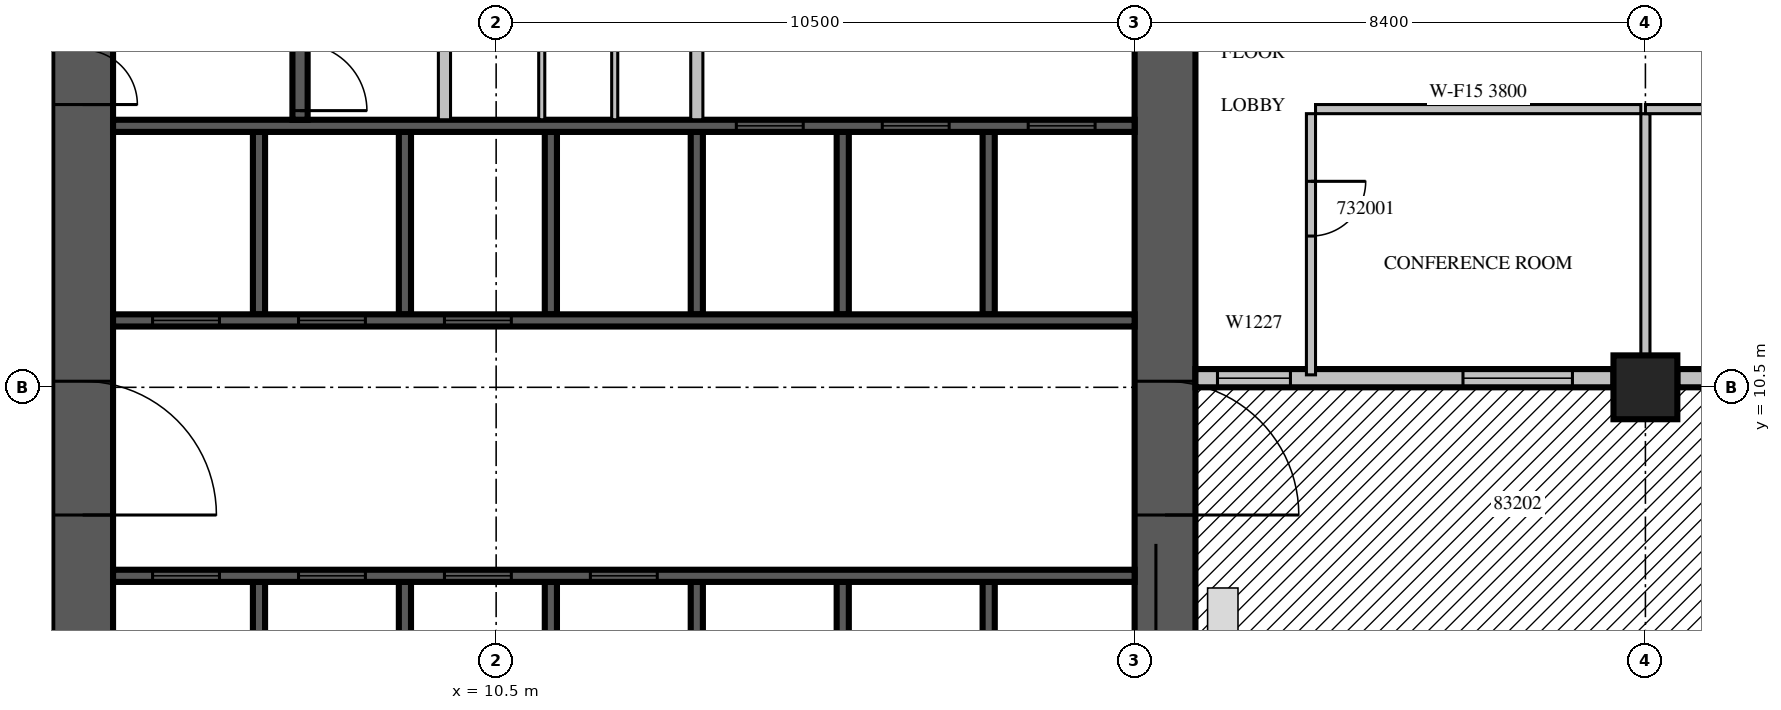
"""IFC4 building model, lengths in metres.
Left out: names, types, materials, properties, quantities, classifications, styles, units other than length and angle.
Written with IfcOpenShell. Run it as: python <this file> out.ifc"""

import sys

from ifc_helpers import new_model, si_unit, direction, frame, frame_2d, origin, origin_2d, place, context, subcontext, project, spatial, rectangle, extrude, source, transform, mapped, element, fill, save


model = new_model("IFC4")
c1 = context("Model", 3, precision=1e-05, world=origin(), true_north=direction((0.0, 1.0)))
c2 = subcontext(c1, "Body", "Model", "MODEL_VIEW")
j1 = project(units=[si_unit("LENGTHUNIT", "METRE"), si_unit("PLANEANGLEUNIT", "RADIAN")], contexts=[c1])
p1 = place(None, origin())
s1 = spatial("IfcSite", under=j1, at=p1, CompositionType="ELEMENT")
p2 = place(p1, origin())
s2 = spatial("IfcBuilding", under=s1, at=p2, CompositionType="ELEMENT")
p3 = place(p2, frame((0.0, 0.0, 145.5)))
s3 = spatial("IfcBuildingStorey", under=s2, at=p3, CompositionType="ELEMENT", Elevation=145.5)
m1 = source(origin(), c2, "Body", "SweptSolid", [
    extrude(rectangle(XDim=1.05, YDim=1.05, at=origin_2d()), origin(), (0.0, 0.0, 1.0), 4.2),
])
p4 = place(p3, frame((29.4, 10.5, 0.0), z_axis=(0.0, 0.0, 1.0), x_axis=(1.0, 0.0, 0.0)))
e1 = element("IfcColumn", 1, at=p4, inside=s3, PredefinedType="COLUMN", context=c2, shape_type="MappedRepresentation", body=[
    mapped(m1, transform((0.0, 0.0, 0.0), scale=1.0)),
])
m2 = source(origin(), c2, "Body", "SweptSolid", [
    extrude(rectangle(XDim=17.8, YDim=1.0, at=frame_2d((8.9, 0.0))), origin(), (0.0, 0.0, 1.0), 4.2),
])
p5 = place(p3, frame((3.7, 4.2, 0.0), z_axis=(0.0, 0.0, 1.0), x_axis=(0.0, 1.0, 0.0)))
e2 = element("IfcWall", 2, at=p5, inside=s3, PredefinedType="SHEAR", context=c2, shape_type="MappedRepresentation", body=[
    mapped(m2, transform((0.0, 0.0, 0.0), scale=1.0)),
])
m3 = source(origin(), c2, "Body", "SweptSolid", [
    extrude(rectangle(XDim=2.2, YDim=2.1, at=frame_2d((1.1, 1.05))), frame((0.0, 0.51, 0.0), z_axis=(0.0, -1.0, 0.0), x_axis=(1.0, 0.0, 0.0)), (0.0, 0.0, 1.0), 1.02),
])
p6 = place(p5, frame((4.2, 0.0, 0.0)))
e3 = element("IfcOpeningElement", 3, at=p6, cuts=e2, PredefinedType="OPENING", context=c2, shape_type="MappedRepresentation", body=[
    mapped(m3, transform((0.0, 0.0, 0.0), scale=1.0)),
])
m4 = source(origin(), c2, "Body", "SweptSolid", [
    extrude(rectangle(XDim=0.9, YDim=2.1, at=frame_2d((0.45, 1.05))), frame((0.0, 0.51, 0.0), z_axis=(0.0, -1.0, 0.0), x_axis=(1.0, 0.0, 0.0)), (0.0, 0.0, 1.0), 1.02),
])
p7 = place(p5, frame((10.95, 0.0, 0.0)))
e4 = element("IfcOpeningElement", 4, at=p7, cuts=e2, PredefinedType="OPENING", context=c2, shape_type="MappedRepresentation", body=[
    mapped(m4, transform((0.0, 0.0, 0.0), scale=1.0)),
])
m5 = source(origin(), c2, "Body", "SweptSolid", [
    extrude(rectangle(XDim=16.8, YDim=1.0, at=frame_2d((8.4, 0.0))), origin(), (0.0, 0.0, 1.0), 4.2),
])
p8 = place(p3, frame((21.5, 4.2, 0.0), z_axis=(0.0, 0.0, 1.0), x_axis=(0.0, 1.0, 0.0)))
e5 = element("IfcWall", 5, at=p8, inside=s3, PredefinedType="SHEAR", context=c2, shape_type="MappedRepresentation", body=[
    mapped(m5, transform((0.0, 0.0, 0.0), scale=1.0)),
])
p9 = place(p8, frame((4.2, 0.0, 0.0)))
e6 = element("IfcOpeningElement", 6, at=p9, cuts=e5, PredefinedType="OPENING", context=c2, shape_type="MappedRepresentation", body=[
    mapped(m3, transform((0.0, 0.0, 0.0), scale=1.0)),
])
m6 = source(origin(), c2, "Body", "SweptSolid", [
    extrude(rectangle(XDim=1.2, YDim=2.1, at=frame_2d((0.6, 1.05))), frame((0.0, 0.51, 0.0), z_axis=(0.0, -1.0, 0.0), x_axis=(1.0, 0.0, 0.0)), (0.0, 0.0, 1.0), 1.02),
])
p10 = place(p8, frame((14.7, 0.0, 0.0)))
e7 = element("IfcOpeningElement", 7, at=p10, cuts=e5, PredefinedType="OPENING", context=c2, shape_type="MappedRepresentation", body=[
    mapped(m6, transform((0.0, 0.0, 0.0), scale=1.0)),
])
m7 = source(origin(), c2, "Body", "SweptSolid", [
    extrude(rectangle(XDim=6.875, YDim=0.3, at=frame_2d((3.438, 0.0))), origin(), (0.0, 0.0, 1.0), 3.8),
])
p11 = place(p3, frame((22.0, 10.65, 0.0), z_axis=(0.0, 0.0, 1.0), x_axis=(1.0, 0.0, 0.0)))
e8 = element("IfcWall", 8, at=p11, inside=s3, PredefinedType="STANDARD", context=c2, shape_type="MappedRepresentation", body=[
    mapped(m7, transform((0.0, 0.0, 0.0), scale=1.0)),
])
m8 = source(origin(), c2, "Body", "SweptSolid", [
    extrude(rectangle(XDim=1.2, YDim=2.7, at=frame_2d((0.6, 1.35))), frame((0.0, 0.16, 0.0), z_axis=(0.0, -1.0, 0.0), x_axis=(1.0, 0.0, 0.0)), (0.0, 0.0, 1.0), 0.32),
])
p12 = place(p11, frame((0.362, 0.0, 0.6)))
e9 = element("IfcOpeningElement", 9, at=p12, cuts=e8, PredefinedType="OPENING", context=c2, shape_type="MappedRepresentation", body=[
    mapped(m8, transform((0.0, 0.0, 0.0), scale=1.0)),
])
m9 = source(origin(), c2, "Body", "SweptSolid", [
    extrude(rectangle(XDim=1.8, YDim=2.4, at=frame_2d((0.9, 1.2))), frame((0.0, 0.16, 0.0), z_axis=(0.0, -1.0, 0.0), x_axis=(1.0, 0.0, 0.0)), (0.0, 0.0, 1.0), 0.32),
])
p13 = place(p11, frame((4.4, 0.0, 0.0)))
e10 = element("IfcOpeningElement", 10, at=p13, cuts=e8, PredefinedType="OPENING", context=c2, shape_type="MappedRepresentation", body=[
    mapped(m9, transform((0.0, 0.0, 0.0), scale=1.0)),
])
m10 = source(origin(), c2, "Body", "SweptSolid", [
    extrude(rectangle(XDim=7.35, YDim=0.3, at=frame_2d((3.675, 0.0))), origin(), (0.0, 0.0, 1.0), 2.8),
])
p14 = place(p3, frame((29.925, 10.65, 0.0), z_axis=(0.0, 0.0, 1.0), x_axis=(1.0, 0.0, 0.0)))
e11 = element("IfcWall", 11, at=p14, inside=s3, PredefinedType="STANDARD", context=c2, shape_type="MappedRepresentation", body=[
    mapped(m10, transform((0.0, 0.0, 0.0), scale=1.0)),
])
p15 = place(p14, frame((0.675, 0.0, 0.0)))
e12 = element("IfcOpeningElement", 12, at=p15, cuts=e11, PredefinedType="OPENING", context=c2, shape_type="MappedRepresentation", body=[
    mapped(m9, transform((0.0, 0.0, 0.0), scale=1.0)),
])
p16 = place(p14, frame((4.875, 0.0, 0.0)))
e13 = element("IfcOpeningElement", 13, at=p16, cuts=e11, PredefinedType="OPENING", context=c2, shape_type="MappedRepresentation", body=[
    mapped(m9, transform((0.0, 0.0, 0.0), scale=1.0)),
])
m11 = source(origin(), c2, "Body", "SweptSolid", [
    extrude(rectangle(XDim=3.1, YDim=0.2, at=frame_2d((1.55, 0.0))), origin(), (0.0, 0.0, 1.0), 4.2),
])
for number, where, z_axis, x_axis in (
    (14, (6.6, 4.2, 0.0), (0.0, 0.0, 1.0), (0.0, 1.0, 0.0)),
    (15, (9.0, 4.2, 0.0), (0.0, 0.0, 1.0), (0.0, 1.0, 0.0)),
    (16, (11.4, 4.2, 0.0), (0.0, 0.0, 1.0), (0.0, 1.0, 0.0)),
    (17, (13.8, 4.2, 0.0), (0.0, 0.0, 1.0), (0.0, 1.0, 0.0)),
    (18, (16.2, 4.2, 0.0), (0.0, 0.0, 1.0), (0.0, 1.0, 0.0)),
    (19, (18.6, 4.2, 0.0), (0.0, 0.0, 1.0), (0.0, 1.0, 0.0)),
):
    element("IfcWall", number, at=place(p3, frame(where, z_axis=z_axis, x_axis=x_axis)), inside=s3, PredefinedType="SOLIDWALL", context=c2, shape_type="MappedRepresentation", body=[
        mapped(m11, transform((0.0, 0.0, 0.0), scale=1.0)),
    ])
m12 = source(origin(), c2, "Body", "SweptSolid", [
    extrude(rectangle(XDim=3.0, YDim=0.2, at=frame_2d((1.5, 0.0))), origin(), (0.0, 0.0, 1.0), 4.2),
])
for number, where, z_axis, x_axis in (
    (20, (6.6, 11.7, 0.0), (0.0, 0.0, 1.0), (0.0, 1.0, 0.0)),
    (21, (9.0, 11.7, 0.0), (0.0, 0.0, 1.0), (0.0, 1.0, 0.0)),
    (22, (11.4, 11.7, 0.0), (0.0, 0.0, 1.0), (0.0, 1.0, 0.0)),
    (23, (13.8, 11.7, 0.0), (0.0, 0.0, 1.0), (0.0, 1.0, 0.0)),
    (24, (16.2, 11.7, 0.0), (0.0, 0.0, 1.0), (0.0, 1.0, 0.0)),
    (25, (18.6, 11.7, 0.0), (0.0, 0.0, 1.0), (0.0, 1.0, 0.0)),
):
    element("IfcWall", number, at=place(p3, frame(where, z_axis=z_axis, x_axis=x_axis)), inside=s3, PredefinedType="SOLIDWALL", context=c2, shape_type="MappedRepresentation", body=[
        mapped(m12, transform((0.0, 0.0, 0.0), scale=1.0)),
    ])
m13 = source(origin(), c2, "Body", "SweptSolid", [
    extrude(rectangle(XDim=16.8, YDim=0.2, at=frame_2d((8.4, 0.0))), origin(), (0.0, 0.0, 1.0), 4.2),
])
p17 = place(p3, frame((4.2, 7.4, 0.0), z_axis=(0.0, 0.0, 1.0), x_axis=(1.0, 0.0, 0.0)))
e26 = element("IfcWall", 26, at=p17, inside=s3, PredefinedType="SOLIDWALL", context=c2, shape_type="MappedRepresentation", body=[
    mapped(m13, transform((0.0, 0.0, 0.0), scale=1.0)),
])
m14 = source(origin(), c2, "Body", "SweptSolid", [
    extrude(rectangle(XDim=1.1, YDim=2.1, at=frame_2d((0.55, 1.05))), frame((0.0, 0.11, 0.0), z_axis=(0.0, -1.0, 0.0), x_axis=(1.0, 0.0, 0.0)), (0.0, 0.0, 1.0), 0.22),
])
p18 = place(p17, frame((0.65, 0.0, 0.0)))
e27 = element("IfcOpeningElement", 27, at=p18, cuts=e26, PredefinedType="OPENING", context=c2, shape_type="MappedRepresentation", body=[
    mapped(m14, transform((0.0, 0.0, 0.0), scale=1.0)),
])
p19 = place(p17, frame((3.05, 0.0, 0.0)))
e28 = element("IfcOpeningElement", 28, at=p19, cuts=e26, PredefinedType="OPENING", context=c2, shape_type="MappedRepresentation", body=[
    mapped(m14, transform((0.0, 0.0, 0.0), scale=1.0)),
])
p20 = place(p17, frame((5.45, 0.0, 0.0)))
e29 = element("IfcOpeningElement", 29, at=p20, cuts=e26, PredefinedType="OPENING", context=c2, shape_type="MappedRepresentation", body=[
    mapped(m14, transform((0.0, 0.0, 0.0), scale=1.0)),
])
p21 = place(p17, frame((7.85, 0.0, 0.0)))
e30 = element("IfcOpeningElement", 30, at=p21, cuts=e26, PredefinedType="OPENING", context=c2, shape_type="MappedRepresentation", body=[
    mapped(m14, transform((0.0, 0.0, 0.0), scale=1.0)),
])
p22 = place(p3, frame((4.2, 11.6, 0.0), z_axis=(0.0, 0.0, 1.0), x_axis=(1.0, 0.0, 0.0)))
e31 = element("IfcWall", 31, at=p22, inside=s3, PredefinedType="SOLIDWALL", context=c2, shape_type="MappedRepresentation", body=[
    mapped(m13, transform((0.0, 0.0, 0.0), scale=1.0)),
])
p23 = place(p22, frame((0.65, 0.0, 0.0)))
e32 = element("IfcOpeningElement", 32, at=p23, cuts=e31, PredefinedType="OPENING", context=c2, shape_type="MappedRepresentation", body=[
    mapped(m14, transform((0.0, 0.0, 0.0), scale=1.0)),
])
p24 = place(p22, frame((3.05, 0.0, 0.0)))
e33 = element("IfcOpeningElement", 33, at=p24, cuts=e31, PredefinedType="OPENING", context=c2, shape_type="MappedRepresentation", body=[
    mapped(m14, transform((0.0, 0.0, 0.0), scale=1.0)),
])
p25 = place(p22, frame((5.45, 0.0, 0.0)))
e34 = element("IfcOpeningElement", 34, at=p25, cuts=e31, PredefinedType="OPENING", context=c2, shape_type="MappedRepresentation", body=[
    mapped(m14, transform((0.0, 0.0, 0.0), scale=1.0)),
])
p26 = place(p3, frame((4.2, 14.8, 0.0), z_axis=(0.0, 0.0, 1.0), x_axis=(1.0, 0.0, 0.0)))
e35 = element("IfcWall", 35, at=p26, inside=s3, PredefinedType="SOLIDWALL", context=c2, shape_type="MappedRepresentation", body=[
    mapped(m13, transform((0.0, 0.0, 0.0), scale=1.0)),
])
p27 = place(p26, frame((10.25, 0.0, 0.0)))
e36 = element("IfcOpeningElement", 36, at=p27, cuts=e35, PredefinedType="OPENING", context=c2, shape_type="MappedRepresentation", body=[
    mapped(m14, transform((0.0, 0.0, 0.0), scale=1.0)),
])
p28 = place(p26, frame((12.65, 0.0, 0.0)))
e37 = element("IfcOpeningElement", 37, at=p28, cuts=e35, PredefinedType="OPENING", context=c2, shape_type="MappedRepresentation", body=[
    mapped(m14, transform((0.0, 0.0, 0.0), scale=1.0)),
])
p29 = place(p26, frame((15.05, 0.0, 0.0)))
e38 = element("IfcOpeningElement", 38, at=p29, cuts=e35, PredefinedType="OPENING", context=c2, shape_type="MappedRepresentation", body=[
    mapped(m14, transform((0.0, 0.0, 0.0), scale=1.0)),
])
m15 = source(origin(), c2, "Body", "SweptSolid", [
    extrude(rectangle(XDim=6.6, YDim=0.25, at=frame_2d((3.3, 0.0))), origin(), (0.0, 0.0, 1.0), 3.8),
])
p30 = place(p3, frame((7.275, 14.9, 0.0), z_axis=(0.0, 0.0, 1.0), x_axis=(0.0, 1.0, 0.0)))
e39 = element("IfcWall", 39, at=p30, inside=s3, PredefinedType="SOLIDWALL", context=c2, shape_type="MappedRepresentation", body=[
    mapped(m15, transform((0.0, 0.0, 0.0), scale=1.0)),
])
m16 = source(origin(), c2, "Body", "SweptSolid", [
    extrude(rectangle(XDim=1.1, YDim=2.1, at=frame_2d((0.55, 1.05))), frame((0.0, 0.135, 0.0), z_axis=(0.0, -1.0, 0.0), x_axis=(1.0, 0.0, 0.0)), (0.0, 0.0, 1.0), 0.27),
])
p31 = place(p30, frame((0.15, 0.0, 0.0)))
e40 = element("IfcOpeningElement", 40, at=p31, cuts=e39, PredefinedType="OPENING", context=c2, shape_type="MappedRepresentation", body=[
    mapped(m16, transform((0.0, 0.0, 0.0), scale=1.0)),
])
m17 = source(origin(), c2, "Body", "SweptSolid", [
    extrude(rectangle(XDim=3.0, YDim=0.2, at=frame_2d((1.5, 0.0))), origin(), (0.0, 0.0, 1.0), 3.8),
])
for number, where, z_axis, x_axis in (
    (41, (9.65, 14.9, 0.0), (0.0, 0.0, 1.0), (0.0, 1.0, 0.0)),
    (42, (13.8, 14.9, 0.0), (0.0, 0.0, 1.0), (0.0, 1.0, 0.0)),
):
    element("IfcWall", number, at=place(p3, frame(where, z_axis=z_axis, x_axis=x_axis)), inside=s3, PredefinedType="PARTITIONING", context=c2, shape_type="MappedRepresentation", body=[
        mapped(m17, transform((0.0, 0.0, 0.0), scale=1.0)),
    ])
m18 = source(origin(), c2, "Body", "SweptSolid", [
    extrude(rectangle(XDim=3.0, YDim=0.1, at=frame_2d((1.5, 0.0))), origin(), (0.0, 0.0, 1.0), 3.8),
])
for number, where, z_axis, x_axis in (
    (43, (11.25, 14.9, 0.0), (0.0, 0.0, 1.0), (0.0, 1.0, 0.0)),
    (44, (12.45, 14.9, 0.0), (0.0, 0.0, 1.0), (0.0, 1.0, 0.0)),
):
    element("IfcWall", number, at=place(p3, frame(where, z_axis=z_axis, x_axis=x_axis)), inside=s3, PredefinedType="PARTITIONING", context=c2, shape_type="MappedRepresentation", body=[
        mapped(m18, transform((0.0, 0.0, 0.0), scale=1.0)),
    ])
m19 = source(origin(), c2, "Body", "SweptSolid", [
    extrude(rectangle(XDim=4.295, YDim=0.15, at=frame_2d((2.147, 0.0))), origin(), (0.0, 0.0, 1.0), 3.8),
])
p32 = place(p3, frame((23.9, 15.0, 0.0), z_axis=(0.0, 0.0, 1.0), x_axis=(0.0, -1.0, 0.0)))
e45 = element("IfcWall", 45, at=p32, inside=s3, PredefinedType="PARTITIONING", context=c2, shape_type="MappedRepresentation", body=[
    mapped(m19, transform((0.0, 0.0, 0.0), scale=1.0)),
])
m20 = source(origin(), c2, "Body", "SweptSolid", [
    extrude(rectangle(XDim=0.9, YDim=2.1, at=frame_2d((0.45, 1.05))), frame((0.0, 0.085, 0.0), z_axis=(0.0, -1.0, 0.0), x_axis=(1.0, 0.0, 0.0)), (0.0, 0.0, 1.0), 0.17),
])
p33 = place(p32, frame((1.113, 0.0, 0.0)))
e46 = element("IfcOpeningElement", 46, at=p33, cuts=e45, PredefinedType="OPENING", context=c2, shape_type="MappedRepresentation", body=[
    mapped(m20, transform((0.0, 0.0, 0.0), scale=1.0)),
])
m21 = source(origin(), c2, "Body", "SweptSolid", [
    extrude(rectangle(XDim=5.35, YDim=0.15, at=frame_2d((2.675, 0.0))), origin(), (0.0, 0.0, 1.0), 3.8),
])
p34 = place(p3, frame((29.325, 15.075, 0.0), z_axis=(0.0, 0.0, 1.0), x_axis=(-1.0, 0.0, 0.0)))
e47 = element("IfcWall", 47, at=p34, inside=s3, PredefinedType="PARTITIONING", context=c2, shape_type="MappedRepresentation", body=[
    mapped(m21, transform((0.0, 0.0, 0.0), scale=1.0)),
])
m22 = source(origin(), c2, "Body", "SweptSolid", [
    extrude(rectangle(XDim=3.976, YDim=0.15, at=frame_2d((1.988, 0.0))), origin(), (0.0, 0.0, 1.0), 3.8),
])
p35 = place(p3, frame((29.4, 11.024, 0.0), z_axis=(0.0, 0.0, 1.0), x_axis=(0.0, 1.0, 0.0)))
e48 = element("IfcWall", 48, at=p35, inside=s3, PredefinedType="PARTITIONING", context=c2, shape_type="MappedRepresentation", body=[
    mapped(m22, transform((0.0, 0.0, 0.0), scale=1.0)),
])
m23 = source(origin(), c2, "Body", "SweptSolid", [
    extrude(rectangle(XDim=8.4, YDim=0.15, at=frame_2d((4.2, 0.0))), origin(), (0.0, 0.0, 1.0), 3.3),
])
p36 = place(p3, frame((37.8, 15.075, 0.0), z_axis=(0.0, 0.0, 1.0), x_axis=(-1.0, 0.0, 0.0)))
e49 = element("IfcWall", 49, at=p36, inside=s3, PredefinedType="PARTITIONING", context=c2, shape_type="MappedRepresentation", body=[
    mapped(m23, transform((0.0, 0.0, 0.0), scale=1.0)),
])
m24 = source(origin(), c2, "Body", "SweptSolid", [
    extrude(rectangle(XDim=1.2, YDim=2.1, at=frame_2d((0.6, 1.05))), frame((0.0, 0.085, 0.0), z_axis=(0.0, -1.0, 0.0), x_axis=(1.0, 0.0, 0.0)), (0.0, 0.0, 1.0), 0.17),
])
p37 = place(p36, frame((3.6, 0.0, 0.0)))
e50 = element("IfcOpeningElement", 50, at=p37, cuts=e49, PredefinedType="OPENING", context=c2, shape_type="MappedRepresentation", body=[
    mapped(m24, transform((0.0, 0.0, 0.0), scale=1.0)),
])
m25 = source(origin(), c2, "Body", "SweptSolid", [
    extrude(rectangle(XDim=1.2, YDim=2.7, at=frame_2d((0.6, 1.35))), frame((0.0, 0.03, 0.0), z_axis=(0.0, -1.0, 0.0), x_axis=(1.0, 0.0, 0.0)), (0.0, 0.0, 1.0), 0.06),
])
p38 = place(p12, origin())
e51 = element("IfcWindow", 51, at=p38, inside=s3, PartitioningType="SINGLE_PANEL", PredefinedType="WINDOW", context=c2, shape_type="MappedRepresentation", body=[
    mapped(m25, transform((0.0, 0.0, 0.0), scale=1.0)),
])
fill(e9, e51)
m26 = source(origin(), c2, "Body", "SweptSolid", [
    extrude(rectangle(XDim=1.8, YDim=2.4, at=frame_2d((0.9, 1.2))), frame((0.0, 0.025, 0.0), z_axis=(0.0, -1.0, 0.0), x_axis=(1.0, 0.0, 0.0)), (0.0, 0.0, 1.0), 0.05),
])
p39 = place(p13, origin())
e52 = element("IfcDoor", 52, at=p39, inside=s3, OperationType="SLIDING_TO_LEFT", PredefinedType="DOOR", context=c2, shape_type="MappedRepresentation", body=[
    mapped(m26, transform((0.0, 0.0, 0.0), scale=1.0)),
])
fill(e10, e52)
m27 = source(origin(), c2, "Body", "SweptSolid", [
    extrude(rectangle(XDim=1.1, YDim=2.1, at=frame_2d((0.55, 1.05))), frame((0.0, 0.025, 0.0), z_axis=(0.0, -1.0, 0.0), x_axis=(1.0, 0.0, 0.0)), (0.0, 0.0, 1.0), 0.05),
])
p40 = place(p18, origin())
e53 = element("IfcDoor", 53, at=p40, inside=s3, OperationType="SLIDING_TO_LEFT", PredefinedType="DOOR", context=c2, shape_type="MappedRepresentation", body=[
    mapped(m27, transform((0.0, 0.0, 0.0), scale=1.0)),
])
fill(e27, e53)
p41 = place(p19, origin())
e54 = element("IfcDoor", 54, at=p41, inside=s3, OperationType="SLIDING_TO_LEFT", PredefinedType="DOOR", context=c2, shape_type="MappedRepresentation", body=[
    mapped(m27, transform((0.0, 0.0, 0.0), scale=1.0)),
])
fill(e28, e54)
p42 = place(p20, origin())
e55 = element("IfcDoor", 55, at=p42, inside=s3, OperationType="SLIDING_TO_LEFT", PredefinedType="DOOR", context=c2, shape_type="MappedRepresentation", body=[
    mapped(m27, transform((0.0, 0.0, 0.0), scale=1.0)),
])
fill(e29, e55)
p43 = place(p21, origin())
e56 = element("IfcDoor", 56, at=p43, inside=s3, OperationType="SLIDING_TO_LEFT", PredefinedType="DOOR", context=c2, shape_type="MappedRepresentation", body=[
    mapped(m27, transform((0.0, 0.0, 0.0), scale=1.0)),
])
fill(e30, e56)
p44 = place(p23, origin())
e57 = element("IfcDoor", 57, at=p44, inside=s3, OperationType="SLIDING_TO_LEFT", PredefinedType="DOOR", context=c2, shape_type="MappedRepresentation", body=[
    mapped(m27, transform((0.0, 0.0, 0.0), scale=1.0)),
])
fill(e32, e57)
p45 = place(p24, origin())
e58 = element("IfcDoor", 58, at=p45, inside=s3, OperationType="SLIDING_TO_LEFT", PredefinedType="DOOR", context=c2, shape_type="MappedRepresentation", body=[
    mapped(m27, transform((0.0, 0.0, 0.0), scale=1.0)),
])
fill(e33, e58)
p46 = place(p25, origin())
e59 = element("IfcDoor", 59, at=p46, inside=s3, OperationType="SLIDING_TO_LEFT", PredefinedType="DOOR", context=c2, shape_type="MappedRepresentation", body=[
    mapped(m27, transform((0.0, 0.0, 0.0), scale=1.0)),
])
fill(e34, e59)
p47 = place(p27, origin())
e60 = element("IfcDoor", 60, at=p47, inside=s3, OperationType="SLIDING_TO_LEFT", PredefinedType="DOOR", context=c2, shape_type="MappedRepresentation", body=[
    mapped(m27, transform((0.0, 0.0, 0.0), scale=1.0)),
])
fill(e36, e60)
p48 = place(p28, origin())
e61 = element("IfcDoor", 61, at=p48, inside=s3, OperationType="SLIDING_TO_LEFT", PredefinedType="DOOR", context=c2, shape_type="MappedRepresentation", body=[
    mapped(m27, transform((0.0, 0.0, 0.0), scale=1.0)),
])
fill(e37, e61)
p49 = place(p29, origin())
e62 = element("IfcDoor", 62, at=p49, inside=s3, OperationType="SLIDING_TO_LEFT", PredefinedType="DOOR", context=c2, shape_type="MappedRepresentation", body=[
    mapped(m27, transform((0.0, 0.0, 0.0), scale=1.0)),
])
fill(e38, e62)
p50 = place(p31, origin())
e63 = element("IfcDoor", 63, at=p50, inside=s3, OperationType="SINGLE_SWING_RIGHT", PredefinedType="DOOR", context=c2, shape_type="MappedRepresentation", body=[
    mapped(m27, transform((0.0, 0.0, 0.0), scale=1.0)),
])
fill(e40, e63)
m28 = source(origin(), c2, "Body", "SweptSolid", [
    extrude(rectangle(XDim=2.2, YDim=2.1, at=frame_2d((1.1, 1.05))), frame((0.0, 0.025, 0.0), z_axis=(0.0, -1.0, 0.0), x_axis=(1.0, 0.0, 0.0)), (0.0, 0.0, 1.0), 0.05),
])
p51 = place(p9, origin())
e64 = element("IfcDoor", 64, at=p51, inside=s3, OperationType="DOUBLE_DOOR_SINGLE_SWING", PredefinedType="DOOR", context=c2, shape_type="MappedRepresentation", body=[
    mapped(m28, transform((0.0, 0.0, 0.0), scale=1.0)),
])
fill(e6, e64)
p52 = place(p6, origin())
e65 = element("IfcDoor", 65, at=p52, inside=s3, OperationType="DOUBLE_DOOR_SINGLE_SWING", PredefinedType="DOOR", context=c2, shape_type="MappedRepresentation", body=[
    mapped(m28, transform((0.0, 0.0, 0.0), scale=1.0)),
])
fill(e3, e65)
m29 = source(origin(), c2, "Body", "SweptSolid", [
    extrude(rectangle(XDim=0.9, YDim=2.1, at=frame_2d((0.45, 1.05))), frame((0.0, 0.025, 0.0), z_axis=(0.0, -1.0, 0.0), x_axis=(1.0, 0.0, 0.0)), (0.0, 0.0, 1.0), 0.05),
])
p53 = place(p7, origin())
e66 = element("IfcDoor", 66, at=p53, inside=s3, OperationType="SINGLE_SWING_RIGHT", PredefinedType="DOOR", context=c2, shape_type="MappedRepresentation", body=[
    mapped(m29, transform((0.0, 0.0, 0.0), scale=1.0)),
])
fill(e4, e66)
p54 = place(p33, origin())
e67 = element("IfcDoor", 67, at=p54, inside=s3, OperationType="SINGLE_SWING_LEFT", PredefinedType="DOOR", context=c2, shape_type="MappedRepresentation", body=[
    mapped(m29, transform((0.0, 0.0, 0.0), scale=1.0)),
])
fill(e46, e67)
save(model, sys.argv[1])
